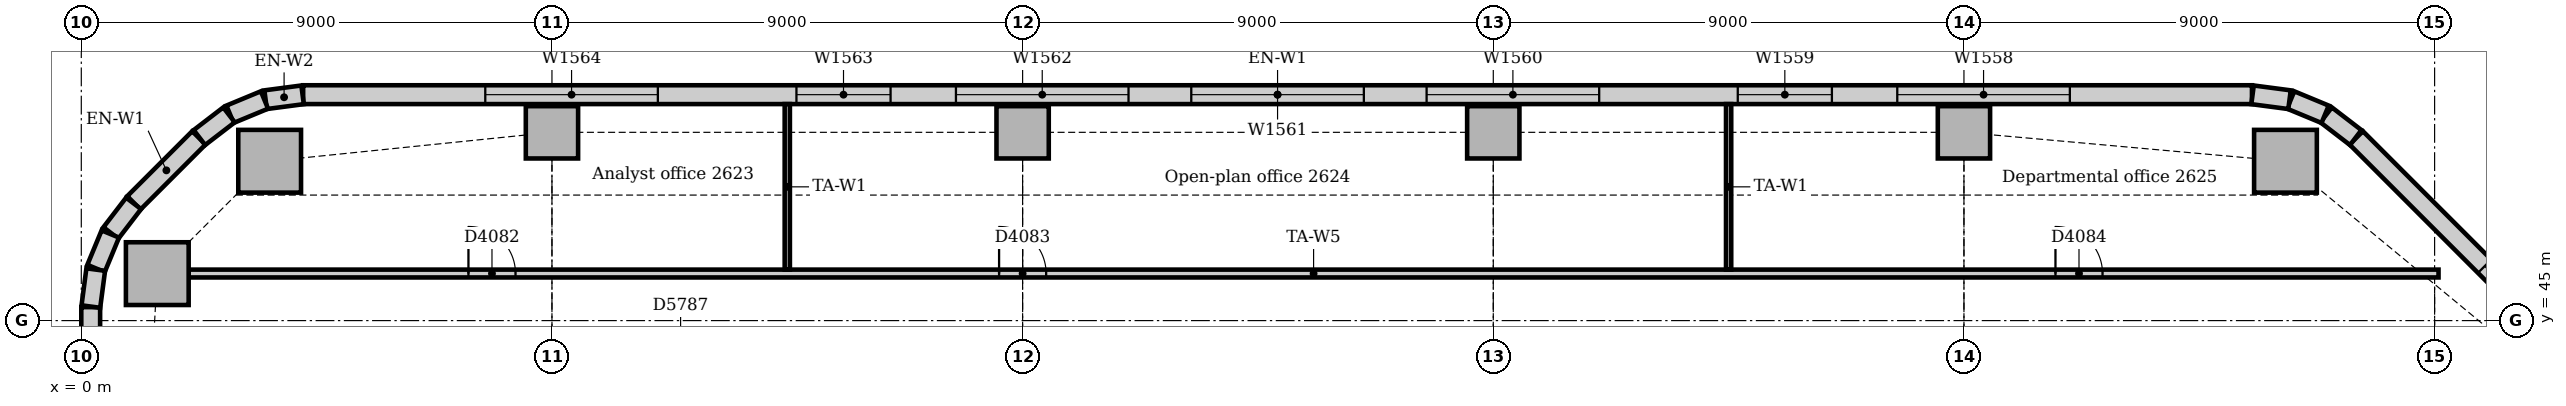
"""IFC4 building model, lengths in metres.
Left out: names, types, materials, properties, quantities, classifications, styles, units other than length and angle.
Written with IfcOpenShell. Run it as: python <this file> out.ifc"""

import sys

from ifc_helpers import new_model, si_unit, direction, frame, frame_2d, origin, origin_2d, place, context, subcontext, project, spatial, rectangle, extrude, element, fill, save


model = new_model("IFC4")
c1 = context("Model", 3, precision=1e-05, world=origin(), true_north=direction((0.0, 1.0)))
c2 = subcontext(c1, "Body", "Model", "MODEL_VIEW")
j1 = project(units=[si_unit("LENGTHUNIT", "METRE"), si_unit("PLANEANGLEUNIT", "RADIAN")], contexts=[c1])
p1 = place(None, origin())
s1 = spatial("IfcSite", under=j1, at=p1, CompositionType="ELEMENT")
p2 = place(p1, origin())
s2 = spatial("IfcBuilding", under=s1, at=p2, CompositionType="ELEMENT")
p3 = place(p2, frame((0.0, 0.0, 112.0)))
s3 = spatial("IfcBuildingStorey", under=s2, at=p3, CompositionType="ELEMENT", Elevation=112.0)
for number, where, z_axis, x_axis in (
    (1, (42.148, 48.047, 0.0), (0.0, 0.0, 1.0), (1.0, 0.0, 0.0)),
    (2, (3.602, 48.047, 0.0), (0.0, 0.0, 1.0), (1.0, 0.0, 0.0)),
    (3, (1.453, 45.898, 0.0), (0.0, 0.0, 1.0), (1.0, 0.0, 0.0)),
):
    element("IfcColumn", number, at=place(p3, frame(where, z_axis=z_axis, x_axis=x_axis)), inside=s3, PredefinedType="COLUMN", context=c2, shape_type="SweptSolid", body=[
        extrude(rectangle(XDim=1.2, YDim=1.2, at=origin_2d()), origin(), (0.0, 0.0, 1.0), 3.85),
    ])
for number, where, z_axis, x_axis in (
    (4, (46.614, 44.364, 0.0), (0.0, 0.0, 1.0), (0.707, 0.707, 0.0)),
    (5, (9.0, 48.6, 0.0), (0.0, 0.0, 1.0), (1.0, 0.0, 0.0)),
    (6, (18.0, 48.6, 0.0), (0.0, 0.0, 1.0), (1.0, 0.0, 0.0)),
    (7, (27.0, 48.6, 0.0), (0.0, 0.0, 1.0), (1.0, 0.0, 0.0)),
    (8, (36.0, 48.6, 0.0), (0.0, 0.0, 1.0), (1.0, 0.0, 0.0)),
):
    element("IfcColumn", number, at=place(p3, frame(where, z_axis=z_axis, x_axis=x_axis)), inside=s3, PredefinedType="COLUMN", context=c2, shape_type="SweptSolid", body=[
        extrude(rectangle(XDim=1.0, YDim=1.0, at=origin_2d()), origin(), (0.0, 0.0, 1.0), 3.85),
    ])
p4 = place(p3, frame((50.744, 41.251, 0.0), z_axis=(0.0, 0.0, 1.0), x_axis=(-0.707106781187, 0.707106781187, 0.0)))
e9 = element("IfcWall", 9, at=p4, inside=s3, PredefinedType="STANDARD", context=c2, shape_type="SweptSolid", body=[
    extrude(rectangle(XDim=10.243, YDim=0.36, at=frame_2d((5.121, 0.0))), origin(), (0.0, 0.0, 1.0), 3.85),
])
p5 = place(p4, frame((3.471, 0.0, 0.9)))
e10 = element("IfcOpeningElement", 10, at=p5, cuts=e9, PredefinedType="OPENING", context=c2, shape_type="SweptSolid", body=[
    extrude(rectangle(XDim=3.3, YDim=1.6, at=frame_2d((1.65, 0.8))), frame((0.0, 0.19, 0.0), z_axis=(0.0, -1.0, 0.0), x_axis=(1.0, 0.0, 0.0)), (0.0, 0.0, 1.0), 0.38),
])
p6 = place(p3, frame((41.507, 49.32, 0.0), z_axis=(0.0, 0.0, 1.0), x_axis=(-1.0, 0.0, 0.0)))
e11 = element("IfcWall", 11, at=p6, inside=s3, PredefinedType="STANDARD", context=c2, shape_type="SweptSolid", body=[
    extrude(rectangle(XDim=37.265, YDim=0.36, at=frame_2d((18.632, 0.0))), origin(), (0.0, 0.0, 1.0), 3.85),
])
p7 = place(p6, frame((3.482, 0.0, 0.9)))
e12 = element("IfcOpeningElement", 12, at=p7, cuts=e11, PredefinedType="OPENING", context=c2, shape_type="SweptSolid", body=[
    extrude(rectangle(XDim=3.3, YDim=1.6, at=frame_2d((1.65, 0.8))), frame((0.0, 0.19, 0.0), z_axis=(0.0, -1.0, 0.0), x_axis=(1.0, 0.0, 0.0)), (0.0, 0.0, 1.0), 0.38),
])
p8 = place(p6, frame((8.032, 0.0, 0.9)))
e13 = element("IfcOpeningElement", 13, at=p8, cuts=e11, PredefinedType="OPENING", context=c2, shape_type="SweptSolid", body=[
    extrude(rectangle(XDim=1.8, YDim=1.6, at=frame_2d((0.9, 0.8))), frame((0.0, 0.19, 0.0), z_axis=(0.0, -1.0, 0.0), x_axis=(1.0, 0.0, 0.0)), (0.0, 0.0, 1.0), 0.38),
])
p9 = place(p6, frame((12.482, 0.0, 0.9)))
e14 = element("IfcOpeningElement", 14, at=p9, cuts=e11, PredefinedType="OPENING", context=c2, shape_type="SweptSolid", body=[
    extrude(rectangle(XDim=3.3, YDim=1.6, at=frame_2d((1.65, 0.8))), frame((0.0, 0.19, 0.0), z_axis=(0.0, -1.0, 0.0), x_axis=(1.0, 0.0, 0.0)), (0.0, 0.0, 1.0), 0.38),
])
p10 = place(p6, frame((16.982, 0.0, 0.9)))
e15 = element("IfcOpeningElement", 15, at=p10, cuts=e11, PredefinedType="OPENING", context=c2, shape_type="SweptSolid", body=[
    extrude(rectangle(XDim=3.3, YDim=1.6, at=frame_2d((1.65, 0.8))), frame((0.0, 0.19, 0.0), z_axis=(0.0, -1.0, 0.0), x_axis=(1.0, 0.0, 0.0)), (0.0, 0.0, 1.0), 0.38),
])
p11 = place(p6, frame((21.482, 0.0, 0.9)))
e16 = element("IfcOpeningElement", 16, at=p11, cuts=e11, PredefinedType="OPENING", context=c2, shape_type="SweptSolid", body=[
    extrude(rectangle(XDim=3.3, YDim=1.6, at=frame_2d((1.65, 0.8))), frame((0.0, 0.19, 0.0), z_axis=(0.0, -1.0, 0.0), x_axis=(1.0, 0.0, 0.0)), (0.0, 0.0, 1.0), 0.38),
])
p12 = place(p6, frame((26.032, 0.0, 0.9)))
e17 = element("IfcOpeningElement", 17, at=p12, cuts=e11, PredefinedType="OPENING", context=c2, shape_type="SweptSolid", body=[
    extrude(rectangle(XDim=1.8, YDim=1.6, at=frame_2d((0.9, 0.8))), frame((0.0, 0.19, 0.0), z_axis=(0.0, -1.0, 0.0), x_axis=(1.0, 0.0, 0.0)), (0.0, 0.0, 1.0), 0.38),
])
p13 = place(p6, frame((30.482, 0.0, 0.9)))
e18 = element("IfcOpeningElement", 18, at=p13, cuts=e11, PredefinedType="OPENING", context=c2, shape_type="SweptSolid", body=[
    extrude(rectangle(XDim=3.3, YDim=1.6, at=frame_2d((1.65, 0.8))), frame((0.0, 0.19, 0.0), z_axis=(0.0, -1.0, 0.0), x_axis=(1.0, 0.0, 0.0)), (0.0, 0.0, 1.0), 0.38),
])
p14 = place(p3, frame((2.249, 48.494, 0.0), z_axis=(0.0, 0.0, 1.0), x_axis=(-0.707106781187, -0.707106781187, 0.0)))
e19 = element("IfcWall", 19, at=p14, inside=s3, PredefinedType="STANDARD", context=c2, shape_type="SweptSolid", body=[
    extrude(rectangle(XDim=1.757, YDim=0.36, at=frame_2d((0.879, 0.0))), origin(), (0.0, 0.0, 1.0), 3.85),
])
p15 = place(p3, frame((0.18, 45.257, 0.0), z_axis=(0.0, 0.0, 1.0), x_axis=(0.0, -1.0, 0.0)))
e20 = element("IfcWall", 20, at=p15, inside=s3, PredefinedType="STANDARD", context=c2, shape_type="SweptSolid", body=[
    extrude(rectangle(XDim=3.257, YDim=0.36, at=frame_2d((1.629, 0.0))), origin(), (0.0, 0.0, 1.0), 3.85),
])
p16 = place(p3, frame((43.491, 48.5, 0.0), z_axis=(0.0, 0.0, 1.0), x_axis=(-0.793321924995, 0.608802368033, 0.0)))
e21 = element("IfcWall", 21, at=p16, inside=s3, PredefinedType="STANDARD", context=c2, shape_type="SweptSolid", body=[
    extrude(rectangle(XDim=0.713, YDim=0.36, at=frame_2d((0.357, 0.0))), origin(), (0.0, 0.0, 1.0), 3.85),
])
for number, where, z_axis, x_axis in (
    (22, (42.906, 48.945, 0.0), (0.0, 0.0, 1.0), (-0.924, 0.383, 0.0)),
    (23, (42.226, 49.224, 0.0), (0.0, 0.0, 1.0), (-0.991, 0.131, 0.0)),
    (24, (4.231, 49.317, 0.0), (0.0, 0.0, 1.0), (-0.991, -0.131, 0.0)),
    (25, (3.503, 49.218, 0.0), (0.0, 0.0, 1.0), (-0.924, -0.383, 0.0)),
):
    element("IfcWall", number, at=place(p3, frame(where, z_axis=z_axis, x_axis=x_axis)), inside=s3, PredefinedType="STANDARD", context=c2, shape_type="SweptSolid", body=[
        extrude(rectangle(XDim=0.713, YDim=0.36, at=frame_2d((0.356, 0.0))), origin(), (0.0, 0.0, 1.0), 3.85),
    ])
for number, where, z_axis, x_axis in (
    (26, (2.825, 48.934, 0.0), (0.0, 0.0, 1.0), (-0.793, -0.609, 0.0)),
    (27, (1.0, 47.241, 0.0), (0.0, 0.0, 1.0), (-0.609, -0.793, 0.0)),
):
    element("IfcWall", number, at=place(p3, frame(where, z_axis=z_axis, x_axis=x_axis)), inside=s3, PredefinedType="STANDARD", context=c2, shape_type="SweptSolid", body=[
        extrude(rectangle(XDim=0.713, YDim=0.36, at=frame_2d((0.357, 0.0))), origin(), (0.0, 0.0, 1.0), 3.85),
    ])
for number, where, z_axis, x_axis in (
    (28, (0.555, 46.656, 0.0), (0.0, 0.0, 1.0), (-0.383, -0.924, 0.0)),
    (29, (0.276, 45.976, 0.0), (0.0, 0.0, 1.0), (-0.131, -0.991, 0.0)),
):
    element("IfcWall", number, at=place(p3, frame(where, z_axis=z_axis, x_axis=x_axis)), inside=s3, PredefinedType="STANDARD", context=c2, shape_type="SweptSolid", body=[
        extrude(rectangle(XDim=0.713, YDim=0.36, at=frame_2d((0.356, 0.0))), origin(), (0.0, 0.0, 1.0), 3.85),
    ])
p17 = place(p3, frame((2.053, 45.9, 0.0), z_axis=(0.0, 0.0, 1.0), x_axis=(1.0, 0.0, 0.0)))
e30 = element("IfcWall", 30, at=p17, inside=s3, PredefinedType="PARTITIONING", context=c2, shape_type="SweptSolid", body=[
    extrude(rectangle(XDim=43.022, YDim=0.15, at=frame_2d((21.511, 0.0))), origin(), (0.0, 0.0, 1.0), 3.85),
])
p18 = place(p17, frame((5.35, 0.0, 0.0)))
e31 = element("IfcOpeningElement", 31, at=p18, cuts=e30, PredefinedType="OPENING", context=c2, shape_type="SweptSolid", body=[
    extrude(rectangle(XDim=0.9, YDim=2.1, at=frame_2d((0.45, 1.05))), frame((0.0, 0.085, 0.0), z_axis=(0.0, -1.0, 0.0), x_axis=(1.0, 0.0, 0.0)), (0.0, 0.0, 1.0), 0.17),
])
p19 = place(p17, frame((15.497, 0.0, 0.0)))
e32 = element("IfcOpeningElement", 32, at=p19, cuts=e30, PredefinedType="OPENING", context=c2, shape_type="SweptSolid", body=[
    extrude(rectangle(XDim=0.9, YDim=2.1, at=frame_2d((0.45, 1.05))), frame((0.0, 0.085, 0.0), z_axis=(0.0, -1.0, 0.0), x_axis=(1.0, 0.0, 0.0)), (0.0, 0.0, 1.0), 0.17),
])
p20 = place(p17, frame((35.697, 0.0, 0.0)))
e33 = element("IfcOpeningElement", 33, at=p20, cuts=e30, PredefinedType="OPENING", context=c2, shape_type="SweptSolid", body=[
    extrude(rectangle(XDim=0.9, YDim=2.1, at=frame_2d((0.45, 1.05))), frame((0.0, 0.085, 0.0), z_axis=(0.0, -1.0, 0.0), x_axis=(1.0, 0.0, 0.0)), (0.0, 0.0, 1.0), 0.17),
])
for number, where, z_axis, x_axis in (
    (34, (13.5, 45.975, 0.0), (0.0, 0.0, 1.0), (0.0, 1.0, 0.0)),
    (35, (31.5, 45.975, 0.0), (0.0, 0.0, 1.0), (0.0, 1.0, 0.0)),
):
    element("IfcWall", number, at=place(p3, frame(where, z_axis=z_axis, x_axis=x_axis)), inside=s3, PredefinedType="PARTITIONING", context=c2, shape_type="SweptSolid", body=[
        extrude(rectangle(XDim=3.165, YDim=0.1, at=frame_2d((1.583, 0.0))), origin(), (0.0, 0.0, 1.0), 3.85),
    ])
p21 = place(p5, origin())
e36 = element("IfcWindow", 36, at=p21, inside=s3, PartitioningType="SINGLE_PANEL", PredefinedType="WINDOW", context=c2, shape_type="SweptSolid", body=[
    extrude(rectangle(XDim=3.3, YDim=1.6, at=frame_2d((1.65, 0.8))), frame((0.0, 0.13, 0.0), z_axis=(0.0, -1.0, 0.0), x_axis=(1.0, 0.0, 0.0)), (0.0, 0.0, 1.0), 0.06),
])
fill(e10, e36)
p22 = place(p7, origin())
e37 = element("IfcWindow", 37, at=p22, inside=s3, PartitioningType="SINGLE_PANEL", PredefinedType="WINDOW", context=c2, shape_type="SweptSolid", body=[
    extrude(rectangle(XDim=3.3, YDim=1.6, at=frame_2d((1.65, 0.8))), frame((0.0, 0.13, 0.0), z_axis=(0.0, -1.0, 0.0), x_axis=(1.0, 0.0, 0.0)), (0.0, 0.0, 1.0), 0.06),
])
fill(e12, e37)
p23 = place(p8, origin())
e38 = element("IfcWindow", 38, at=p23, inside=s3, PartitioningType="SINGLE_PANEL", PredefinedType="WINDOW", context=c2, shape_type="SweptSolid", body=[
    extrude(rectangle(XDim=1.8, YDim=1.6, at=frame_2d((0.9, 0.8))), frame((0.0, 0.13, 0.0), z_axis=(0.0, -1.0, 0.0), x_axis=(1.0, 0.0, 0.0)), (0.0, 0.0, 1.0), 0.06),
])
fill(e13, e38)
p24 = place(p9, origin())
e39 = element("IfcWindow", 39, at=p24, inside=s3, PartitioningType="SINGLE_PANEL", PredefinedType="WINDOW", context=c2, shape_type="SweptSolid", body=[
    extrude(rectangle(XDim=3.3, YDim=1.6, at=frame_2d((1.65, 0.8))), frame((0.0, 0.13, 0.0), z_axis=(0.0, -1.0, 0.0), x_axis=(1.0, 0.0, 0.0)), (0.0, 0.0, 1.0), 0.06),
])
fill(e14, e39)
p25 = place(p10, origin())
e40 = element("IfcWindow", 40, at=p25, inside=s3, PartitioningType="SINGLE_PANEL", PredefinedType="WINDOW", context=c2, shape_type="SweptSolid", body=[
    extrude(rectangle(XDim=3.3, YDim=1.6, at=frame_2d((1.65, 0.8))), frame((0.0, 0.13, 0.0), z_axis=(0.0, -1.0, 0.0), x_axis=(1.0, 0.0, 0.0)), (0.0, 0.0, 1.0), 0.06),
])
fill(e15, e40)
p26 = place(p11, origin())
e41 = element("IfcWindow", 41, at=p26, inside=s3, PartitioningType="SINGLE_PANEL", PredefinedType="WINDOW", context=c2, shape_type="SweptSolid", body=[
    extrude(rectangle(XDim=3.3, YDim=1.6, at=frame_2d((1.65, 0.8))), frame((0.0, 0.13, 0.0), z_axis=(0.0, -1.0, 0.0), x_axis=(1.0, 0.0, 0.0)), (0.0, 0.0, 1.0), 0.06),
])
fill(e16, e41)
p27 = place(p12, origin())
e42 = element("IfcWindow", 42, at=p27, inside=s3, PartitioningType="SINGLE_PANEL", PredefinedType="WINDOW", context=c2, shape_type="SweptSolid", body=[
    extrude(rectangle(XDim=1.8, YDim=1.6, at=frame_2d((0.9, 0.8))), frame((0.0, 0.13, 0.0), z_axis=(0.0, -1.0, 0.0), x_axis=(1.0, 0.0, 0.0)), (0.0, 0.0, 1.0), 0.06),
])
fill(e17, e42)
p28 = place(p13, origin())
e43 = element("IfcWindow", 43, at=p28, inside=s3, PartitioningType="SINGLE_PANEL", PredefinedType="WINDOW", context=c2, shape_type="SweptSolid", body=[
    extrude(rectangle(XDim=3.3, YDim=1.6, at=frame_2d((1.65, 0.8))), frame((0.0, 0.13, 0.0), z_axis=(0.0, -1.0, 0.0), x_axis=(1.0, 0.0, 0.0)), (0.0, 0.0, 1.0), 0.06),
])
fill(e18, e43)
p29 = place(p18, origin())
e44 = element("IfcDoor", 44, at=p29, inside=s3, OperationType="SINGLE_SWING_LEFT", PredefinedType="DOOR", context=c2, shape_type="SweptSolid", body=[
    extrude(rectangle(XDim=0.9, YDim=2.1, at=frame_2d((0.45, 1.05))), frame((0.0, 0.025, 0.0), z_axis=(0.0, -1.0, 0.0), x_axis=(1.0, 0.0, 0.0)), (0.0, 0.0, 1.0), 0.05),
])
fill(e31, e44)
p30 = place(p19, origin())
e45 = element("IfcDoor", 45, at=p30, inside=s3, OperationType="SINGLE_SWING_LEFT", PredefinedType="DOOR", context=c2, shape_type="SweptSolid", body=[
    extrude(rectangle(XDim=0.9, YDim=2.1, at=frame_2d((0.45, 1.05))), frame((0.0, 0.025, 0.0), z_axis=(0.0, -1.0, 0.0), x_axis=(1.0, 0.0, 0.0)), (0.0, 0.0, 1.0), 0.05),
])
fill(e32, e45)
p31 = place(p20, origin())
e46 = element("IfcDoor", 46, at=p31, inside=s3, OperationType="SINGLE_SWING_LEFT", PredefinedType="DOOR", context=c2, shape_type="SweptSolid", body=[
    extrude(rectangle(XDim=0.9, YDim=2.1, at=frame_2d((0.45, 1.05))), frame((0.0, 0.025, 0.0), z_axis=(0.0, -1.0, 0.0), x_axis=(1.0, 0.0, 0.0)), (0.0, 0.0, 1.0), 0.05),
])
fill(e33, e46)
save(model, sys.argv[1])
